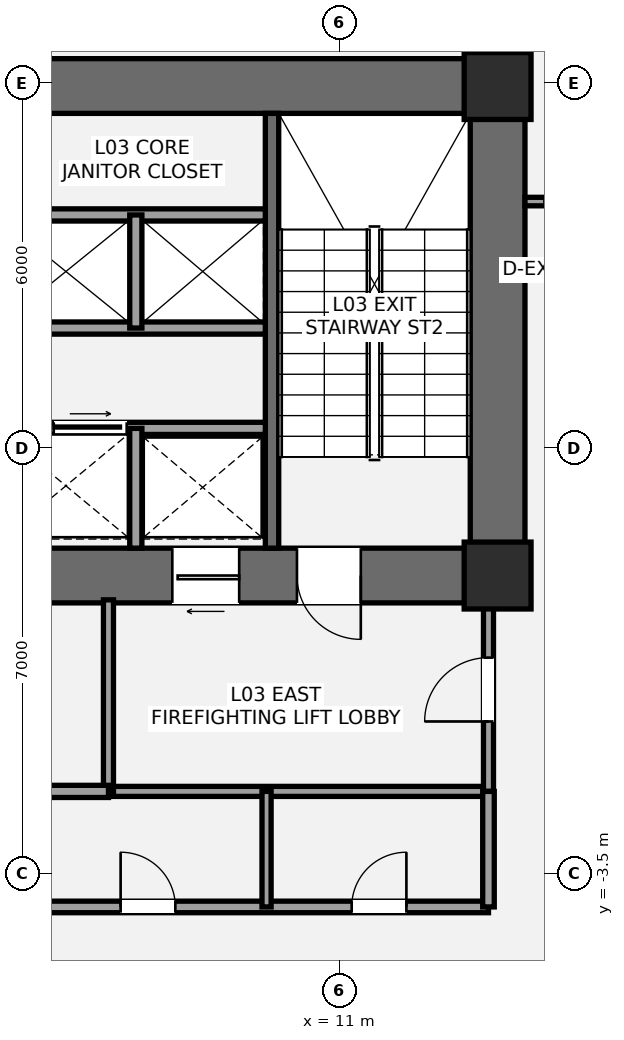
"""IFC4 building model, lengths in metres.
Left out: names, types, materials, properties, quantities, classifications, styles, units other than length and angle.
Written with IfcOpenShell. Run it as: python <this file> out.ifc"""

import sys

from ifc_helpers import new_model, si_unit, direction, frame, frame_2d, origin, origin_2d, place, context, subcontext, project, spatial, rectangle, extrude, element, fill, save


model = new_model("IFC4")
c1 = context("Model", 3, precision=1e-05, world=origin(), true_north=direction((0.0, 1.0)))
c2 = subcontext(c1, "Body", "Model", "MODEL_VIEW")
j1 = project(units=[si_unit("LENGTHUNIT", "METRE"), si_unit("PLANEANGLEUNIT", "RADIAN")], contexts=[c1])
p1 = place(None, origin())
s1 = spatial("IfcSite", under=j1, at=p1, CompositionType="ELEMENT")
p2 = place(p1, origin())
s2 = spatial("IfcBuilding", under=s1, at=p2, CompositionType="ELEMENT")
p3 = place(p2, frame((0.0, 0.0, 14.4)))
s3 = spatial("IfcBuildingStorey", under=s2, at=p3, CompositionType="ELEMENT", Elevation=14.4)
p4 = place(p3, frame((13.6, 0.95, 0.0), z_axis=(0.0, 0.0, 1.0), x_axis=(0.0, 1.0, 0.0)))
e1 = element("IfcWall", 1, at=p4, inside=s3, PredefinedType="SHEAR", context=c2, shape_type="SweptSolid", body=[
    extrude(rectangle(XDim=8.95, YDim=0.9, at=frame_2d((4.475, 0.0))), origin(), (0.0, 0.0, 1.0), 4.2),
])
p5 = place(p3, frame((4.35, 9.45, 0.0), z_axis=(0.0, 0.0, 1.0), x_axis=(1.0, 0.0, 0.0)))
e2 = element("IfcWall", 2, at=p5, inside=s3, PredefinedType="SHEAR", context=c2, shape_type="SweptSolid", body=[
    extrude(rectangle(XDim=9.7, YDim=0.9, at=frame_2d((4.85, 0.0))), origin(), (0.0, 0.0, 1.0), 4.2),
])
p6 = place(p3, frame((14.05, 1.4, 0.0), z_axis=(0.0, 0.0, 1.0), x_axis=(-1.0, 0.0, 0.0)))
e3 = element("IfcWall", 3, at=p6, inside=s3, PredefinedType="SHEAR", context=c2, shape_type="SweptSolid", body=[
    extrude(rectangle(XDim=9.3, YDim=0.9, at=frame_2d((4.65, 0.0))), origin(), (0.0, 0.0, 1.0), 4.2),
])
p7 = place(p6, frame((2.7, 0.0, 0.0)))
e4 = element("IfcOpeningElement", 4, at=p7, cuts=e3, PredefinedType="OPENING", context=c2, shape_type="SweptSolid", body=[
    extrude(rectangle(XDim=1.05, YDim=2.15, at=frame_2d((0.525, 1.075))), frame((0.0, 0.46, 0.0), z_axis=(0.0, -1.0, 0.0), x_axis=(1.0, 0.0, 0.0)), (0.0, 0.0, 1.0), 0.92),
])
p8 = place(p6, frame((4.7, 0.0, 0.0)))
e5 = element("IfcOpeningElement", 5, at=p8, cuts=e3, PredefinedType="OPENING", context=c2, shape_type="SweptSolid", body=[
    extrude(rectangle(XDim=1.1, YDim=2.2, at=frame_2d((0.55, 1.1))), frame((0.0, 0.46, 0.0), z_axis=(0.0, -1.0, 0.0), x_axis=(1.0, 0.0, 0.0)), (0.0, 0.0, 1.0), 0.92),
])
p9 = place(p3, frame((9.89, 1.85, 0.0), z_axis=(0.0, 0.0, 1.0), x_axis=(0.0, 1.0, 0.0)))
e6 = element("IfcWall", 6, at=p9, inside=s3, PredefinedType="SHEAR", context=c2, shape_type="SweptSolid", body=[
    extrude(rectangle(XDim=7.15, YDim=0.22, at=frame_2d((3.575, 0.0))), origin(), (0.0, 0.0, 1.0), 4.2),
])
for number, where, z_axis, x_axis in (
    (7, (13.6, 1.4, 0.0), (0.0, 0.0, 1.0), (1.0, 0.0, 0.0)),
    (8, (13.6, 9.45, 0.0), (0.0, 0.0, 1.0), (1.0, 0.0, 0.0)),
):
    element("IfcColumn", number, at=place(p3, frame(where, z_axis=z_axis, x_axis=x_axis)), inside=s3, PredefinedType="COLUMN", context=c2, shape_type="SweptSolid", body=[
        extrude(rectangle(XDim=1.1, YDim=1.1, at=origin_2d()), origin(), (0.0, 0.0, 1.0), 4.2),
    ])
p10 = place(p3, frame((7.2, -2.15, 0.0), z_axis=(0.0, 0.0, 1.0), x_axis=(1.0, 0.0, 0.0)))
e9 = element("IfcWall", 9, at=p10, inside=s3, PredefinedType="PARTITIONING", context=c2, shape_type="SweptSolid", body=[
    extrude(rectangle(XDim=6.25, YDim=0.165, at=frame_2d((3.125, 0.0))), origin(), (0.0, 0.0, 1.0), 3.98),
])
p11 = place(p3, frame((7.2, -2.15, 0.0), z_axis=(0.0, 0.0, 1.0), x_axis=(0.0, 1.0, 0.0)))
e10 = element("IfcWall", 10, at=p11, inside=s3, PredefinedType="PARTITIONING", context=c2, shape_type="SweptSolid", body=[
    extrude(rectangle(XDim=3.15, YDim=0.165, at=frame_2d((1.575, 0.0))), origin(), (0.0, 0.0, 1.0), 3.98),
])
p12 = place(p3, frame((13.45, -2.15, 0.0), z_axis=(0.0, 0.0, 1.0), x_axis=(0.0, 1.0, 0.0)))
e11 = element("IfcWall", 11, at=p12, inside=s3, PredefinedType="PARTITIONING", context=c2, shape_type="SweptSolid", body=[
    extrude(rectangle(XDim=3.15, YDim=0.165, at=frame_2d((1.575, 0.0))), origin(), (0.0, 0.0, 1.0), 3.433),
])
p13 = place(p12, frame((1.15, 0.0, 0.0)))
e12 = element("IfcOpeningElement", 12, at=p13, cuts=e11, PredefinedType="OPENING", context=c2, shape_type="SweptSolid", body=[
    extrude(rectangle(XDim=1.05, YDim=2.15, at=frame_2d((0.525, 1.075))), frame((0.0, 0.093, 0.0), z_axis=(0.0, -1.0, 0.0), x_axis=(1.0, 0.0, 0.0)), (0.0, 0.0, 1.0), 0.185),
])
p14 = place(p3, frame((4.95, -2.15, 0.0), z_axis=(0.0, 0.0, 1.0), x_axis=(1.0, 0.0, 0.0)))
e13 = element("IfcWall", 13, at=p14, inside=s3, PredefinedType="SOLIDWALL", context=c2, shape_type="SweptSolid", body=[
    extrude(rectangle(XDim=2.25, YDim=0.2, at=frame_2d((1.125, 0.0))), origin(), (0.0, 0.0, 1.0), 3.98),
])
p15 = place(p3, frame((5.65, 3.82, 0.0), z_axis=(0.0, 0.0, 1.0), x_axis=(1.0, 0.0, 0.0)))
e14 = element("IfcWall", 14, at=p15, inside=s3, PredefinedType="SOLIDWALL", context=c2, shape_type="SweptSolid", body=[
    extrude(rectangle(XDim=4.13, YDim=0.2, at=frame_2d((2.065, 0.0))), origin(), (0.0, 0.0, 1.0), 3.98),
])
p16 = place(p15, frame((0.65, 0.0, 0.0)))
e15 = element("IfcOpeningElement", 15, at=p16, cuts=e14, PredefinedType="OPENING", context=c2, shape_type="SweptSolid", body=[
    extrude(rectangle(XDim=1.2, YDim=2.2, at=frame_2d((0.6, 1.1))), frame((0.0, 0.11, 0.0), z_axis=(0.0, -1.0, 0.0), x_axis=(1.0, 0.0, 0.0)), (0.0, 0.0, 1.0), 0.22),
])
p17 = place(p3, frame((7.65, 1.85, 0.0), z_axis=(0.0, 0.0, 1.0), x_axis=(0.0, 1.0, 0.0)))
e16 = element("IfcWall", 16, at=p17, inside=s3, PredefinedType="SOLIDWALL", context=c2, shape_type="SweptSolid", body=[
    extrude(rectangle(XDim=1.97, YDim=0.2, at=frame_2d((0.985, 0.0))), origin(), (0.0, 0.0, 1.0), 3.98),
])
for number, where, z_axis, x_axis in (
    (17, (5.65, 5.47, 0.0), (0.0, 0.0, 1.0), (1.0, 0.0, 0.0)),
    (18, (5.65, 7.33, 0.0), (0.0, 0.0, 1.0), (1.0, 0.0, 0.0)),
):
    element("IfcWall", number, at=place(p3, frame(where, z_axis=z_axis, x_axis=x_axis)), inside=s3, PredefinedType="SOLIDWALL", context=c2, shape_type="SweptSolid", body=[
        extrude(rectangle(XDim=4.13, YDim=0.2, at=frame_2d((2.065, 0.0))), origin(), (0.0, 0.0, 1.0), 3.98),
    ])
p18 = place(p3, frame((7.65, 5.47, 0.0), z_axis=(0.0, 0.0, 1.0), x_axis=(0.0, 1.0, 0.0)))
e19 = element("IfcWall", 19, at=p18, inside=s3, PredefinedType="SOLIDWALL", context=c2, shape_type="SweptSolid", body=[
    extrude(rectangle(XDim=1.86, YDim=0.2, at=frame_2d((0.93, 0.0))), origin(), (0.0, 0.0, 1.0), 3.98),
])
p19 = place(p3, frame((2.1, -4.05, 0.0), z_axis=(0.0, 0.0, 1.0), x_axis=(1.0, 0.0, 0.0)))
e20 = element("IfcWall", 20, at=p19, inside=s3, PredefinedType="PLUMBINGWALL", context=c2, shape_type="SweptSolid", body=[
    extrude(rectangle(XDim=11.35, YDim=0.19, at=frame_2d((5.675, 0.0))), origin(), (0.0, 0.0, 1.0), 3.507),
])
p20 = place(p19, frame((1.4, 0.0, 0.0)))
e21 = element("IfcOpeningElement", 21, at=p20, cuts=e20, PredefinedType="OPENING", context=c2, shape_type="SweptSolid", body=[
    extrude(rectangle(XDim=0.9, YDim=2.1, at=frame_2d((0.45, 1.05))), frame((0.0, 0.105, 0.0), z_axis=(0.0, -1.0, 0.0), x_axis=(1.0, 0.0, 0.0)), (0.0, 0.0, 1.0), 0.21),
])
p21 = place(p19, frame((5.3, 0.0, 0.0)))
e22 = element("IfcOpeningElement", 22, at=p21, cuts=e20, PredefinedType="OPENING", context=c2, shape_type="SweptSolid", body=[
    extrude(rectangle(XDim=0.9, YDim=2.1, at=frame_2d((0.45, 1.05))), frame((0.0, 0.105, 0.0), z_axis=(0.0, -1.0, 0.0), x_axis=(1.0, 0.0, 0.0)), (0.0, 0.0, 1.0), 0.21),
])
p22 = place(p19, frame((9.1, 0.0, 0.0)))
e23 = element("IfcOpeningElement", 23, at=p22, cuts=e20, PredefinedType="OPENING", context=c2, shape_type="SweptSolid", body=[
    extrude(rectangle(XDim=0.9, YDim=2.1, at=frame_2d((0.45, 1.05))), frame((0.0, 0.105, 0.0), z_axis=(0.0, -1.0, 0.0), x_axis=(1.0, 0.0, 0.0)), (0.0, 0.0, 1.0), 0.21),
])
p23 = place(p3, frame((13.45, -4.05, 0.0), z_axis=(0.0, 0.0, 1.0), x_axis=(0.0, 1.0, 0.0)))
e24 = element("IfcWall", 24, at=p23, inside=s3, PredefinedType="PLUMBINGWALL", context=c2, shape_type="SweptSolid", body=[
    extrude(rectangle(XDim=1.9, YDim=0.19, at=frame_2d((0.95, 0.0))), origin(), (0.0, 0.0, 1.0), 3.98),
])
p24 = place(p3, frame((9.8, -4.05, 0.0), z_axis=(0.0, 0.0, 1.0), x_axis=(0.0, 1.0, 0.0)))
e25 = element("IfcWall", 25, at=p24, inside=s3, PredefinedType="PLUMBINGWALL", context=c2, shape_type="SweptSolid", body=[
    extrude(rectangle(XDim=1.9, YDim=0.15, at=frame_2d((0.95, 0.0))), origin(), (0.0, 0.0, 1.0), 3.98),
])
p25 = place(p3, frame((14.05, 7.55, 0.0), z_axis=(0.0, 0.0, 1.0), x_axis=(1.0, 0.0, 0.0)))
e26 = element("IfcWall", 26, at=p25, inside=s3, PredefinedType="PARTITIONING", context=c2, shape_type="SweptSolid", body=[
    extrude(rectangle(XDim=1.95, YDim=0.14, at=frame_2d((0.975, 0.0))), origin(), (0.0, 0.0, 1.0), 3.433),
])
p26 = place(p25, frame((0.32, 0.0, 0.0)))
e27 = element("IfcOpeningElement", 27, at=p26, cuts=e26, PredefinedType="OPENING", context=c2, shape_type="SweptSolid", body=[
    extrude(rectangle(XDim=0.92, YDim=2.15, at=frame_2d((0.46, 1.075))), frame((0.0, 0.08, 0.0), z_axis=(0.0, -1.0, 0.0), x_axis=(1.0, 0.0, 0.0)), (0.0, 0.0, 1.0), 0.16),
])
p27 = place(p7, origin())
e28 = element("IfcDoor", 28, at=p27, inside=s3, OperationType="SINGLE_SWING_LEFT", PredefinedType="DOOR", context=c2, shape_type="SweptSolid", body=[
    extrude(rectangle(XDim=1.05, YDim=2.15, at=frame_2d((0.525, 1.075))), frame((0.0, 0.025, 0.0), z_axis=(0.0, -1.0, 0.0), x_axis=(1.0, 0.0, 0.0)), (0.0, 0.0, 1.0), 0.05),
])
fill(e4, e28)
p28 = place(p13, origin())
e29 = element("IfcDoor", 29, at=p28, inside=s3, OperationType="SINGLE_SWING_LEFT", PredefinedType="DOOR", context=c2, shape_type="SweptSolid", body=[
    extrude(rectangle(XDim=1.05, YDim=2.15, at=frame_2d((0.525, 1.075))), frame((0.0, 0.025, 0.0), z_axis=(0.0, -1.0, 0.0), x_axis=(1.0, 0.0, 0.0)), (0.0, 0.0, 1.0), 0.05),
])
fill(e12, e29)
p29 = place(p8, origin())
e30 = element("IfcDoor", 30, at=p29, inside=s3, OperationType="SLIDING_TO_LEFT", PredefinedType="DOOR", context=c2, shape_type="SweptSolid", body=[
    extrude(rectangle(XDim=1.1, YDim=2.2, at=frame_2d((0.55, 1.1))), frame((0.0, 0.025, 0.0), z_axis=(0.0, -1.0, 0.0), x_axis=(1.0, 0.0, 0.0)), (0.0, 0.0, 1.0), 0.05),
])
fill(e5, e30)
p30 = place(p16, origin())
e31 = element("IfcDoor", 31, at=p30, inside=s3, OperationType="SLIDING_TO_RIGHT", PredefinedType="DOOR", context=c2, shape_type="SweptSolid", body=[
    extrude(rectangle(XDim=1.2, YDim=2.2, at=frame_2d((0.6, 1.1))), frame((0.0, 0.025, 0.0), z_axis=(0.0, -1.0, 0.0), x_axis=(1.0, 0.0, 0.0)), (0.0, 0.0, 1.0), 0.05),
])
fill(e15, e31)
p31 = place(p21, origin())
e32 = element("IfcDoor", 32, at=p31, inside=s3, OperationType="SINGLE_SWING_LEFT", PredefinedType="DOOR", context=c2, shape_type="SweptSolid", body=[
    extrude(rectangle(XDim=0.9, YDim=2.1, at=frame_2d((0.45, 1.05))), frame((0.0, 0.025, 0.0), z_axis=(0.0, -1.0, 0.0), x_axis=(1.0, 0.0, 0.0)), (0.0, 0.0, 1.0), 0.05),
])
fill(e22, e32)
p32 = place(p22, origin())
e33 = element("IfcDoor", 33, at=p32, inside=s3, OperationType="SINGLE_SWING_RIGHT", PredefinedType="DOOR", context=c2, shape_type="SweptSolid", body=[
    extrude(rectangle(XDim=0.9, YDim=2.1, at=frame_2d((0.45, 1.05))), frame((0.0, 0.025, 0.0), z_axis=(0.0, -1.0, 0.0), x_axis=(1.0, 0.0, 0.0)), (0.0, 0.0, 1.0), 0.05),
])
fill(e23, e33)
save(model, sys.argv[1])
